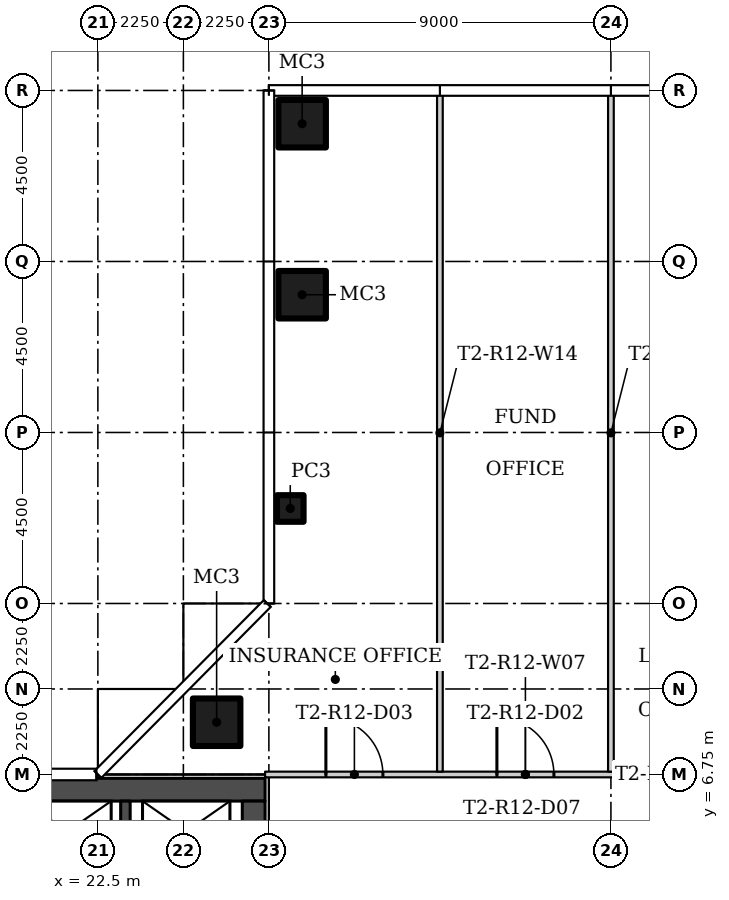
"""IFC4 building model, lengths in metres.
Left out: names, types, materials, properties, quantities, classifications, styles, units other than length and angle.
Written with IfcOpenShell. Run it as: python <this file> out.ifc"""

import sys

from ifc_helpers import new_model, si_unit, direction, frame, frame_2d, origin, origin_2d, place, context, subcontext, project, spatial, rectangle, hollow_rectangle, extrude, element, fill, save


model = new_model("IFC4")
c1 = context("Model", 3, precision=1e-05, world=origin(), true_north=direction((0.0, 1.0)))
c2 = subcontext(c1, "Body", "Model", "MODEL_VIEW")
j1 = project(units=[si_unit("LENGTHUNIT", "METRE"), si_unit("PLANEANGLEUNIT", "RADIAN")], contexts=[c1])
p1 = place(None, origin())
s1 = spatial("IfcSite", under=j1, at=p1, CompositionType="ELEMENT")
p2 = place(p1, origin())
s2 = spatial("IfcBuilding", under=s1, at=p2, CompositionType="ELEMENT")
p3 = place(p2, frame((0.0, 0.0, 113.1)))
s3 = spatial("IfcBuildingStorey", under=s2, at=p3, CompositionType="ELEMENT", Elevation=113.1)
p4 = place(p3, frame((25.625, 8.125, 0.0)))
e1 = element("IfcColumn", 1, at=p4, inside=s3, PredefinedType="COLUMN", context=c2, shape_type="SweptSolid", body=[
    extrude(hollow_rectangle(XDim=1.25, YDim=1.25, WallThickness=0.05, at=origin_2d()), origin(), (0.0, 0.0, 1.0), 3.55),
])
p5 = place(p3, frame((27.562, 13.75, 0.0)))
e2 = element("IfcColumn", 2, at=p5, inside=s3, PredefinedType="COLUMN", context=c2, shape_type="SweptSolid", body=[
    extrude(hollow_rectangle(XDim=0.7, YDim=0.7, WallThickness=0.025, at=origin_2d()), origin(), (0.0, 0.0, 1.0), 3.55),
])
for number, where in (
    (3, (27.875, 19.375, 0.0)),
    (4, (27.875, 23.875, 0.0)),
):
    element("IfcColumn", number, at=place(p3, frame(where)), inside=s3, PredefinedType="COLUMN", context=c2, shape_type="SweptSolid", body=[
        extrude(hollow_rectangle(XDim=1.25, YDim=1.25, WallThickness=0.05, at=origin_2d()), origin(), (0.0, 0.0, 1.0), 3.55),
    ])
p6 = place(p3, frame((26.9, 6.75, 0.0)))
e5 = element("IfcWall", 5, at=p6, inside=s3, PredefinedType="PARTITIONING", context=c2, shape_type="SweptSolid", body=[
    extrude(rectangle(XDim=13.7, YDim=0.15, at=frame_2d((6.85, 0.0))), origin(), (0.0, 0.0, 1.0), 3.55),
])
p7 = place(p6, frame((10.85, 0.0, 0.0)))
e6 = element("IfcOpeningElement", 6, at=p7, cuts=e5, PredefinedType="OPENING", context=c2, shape_type="SweptSolid", body=[
    extrude(rectangle(XDim=1.0, YDim=2.4, at=frame_2d((0.5, 1.2))), frame((0.0, 0.085, 0.0), z_axis=(0.0, -1.0, 0.0), x_axis=(1.0, 0.0, 0.0)), (0.0, 0.0, 1.0), 0.17),
])
p8 = place(p6, frame((6.1, 0.0, 0.0)))
e7 = element("IfcOpeningElement", 7, at=p8, cuts=e5, PredefinedType="OPENING", context=c2, shape_type="SweptSolid", body=[
    extrude(rectangle(XDim=1.5, YDim=2.1, at=frame_2d((0.75, 1.05))), frame((0.0, 0.085, 0.0), z_axis=(0.0, -1.0, 0.0), x_axis=(1.0, 0.0, 0.0)), (0.0, 0.0, 1.0), 0.17),
])
p9 = place(p6, frame((1.6, 0.0, 0.0)))
e8 = element("IfcOpeningElement", 8, at=p9, cuts=e5, PredefinedType="OPENING", context=c2, shape_type="SweptSolid", body=[
    extrude(rectangle(XDim=1.5, YDim=2.1, at=frame_2d((0.75, 1.05))), frame((0.0, 0.085, 0.0), z_axis=(0.0, -1.0, 0.0), x_axis=(1.0, 0.0, 0.0)), (0.0, 0.0, 1.0), 0.17),
])
for number, where, z_axis, x_axis in (
    (9, (36.0, 24.655, 0.0), (0.0, 0.0, 1.0), (0.0, -1.0, 0.0)),
    (10, (31.5, 24.655, 0.0), (0.0, 0.0, 1.0), (0.0, -1.0, 0.0)),
):
    element("IfcWall", number, at=place(p3, frame(where, z_axis=z_axis, x_axis=x_axis)), inside=s3, PredefinedType="PARTITIONING", context=c2, shape_type="SweptSolid", body=[
        extrude(rectangle(XDim=17.83, YDim=0.15, at=frame_2d((8.915, 0.0))), origin(), (0.0, 0.0, 1.0), 3.55),
    ])
p10 = place(p3, frame((13.6, 6.35, 0.0)))
e11 = element("IfcWall", 11, at=p10, inside=s3, PredefinedType="SHEAR", context=c2, shape_type="SweptSolid", body=[
    extrude(rectangle(XDim=13.3, YDim=0.6, at=frame_2d((6.65, 0.0))), origin(), (0.0, 0.0, 1.0), 3.55),
])
p11 = place(p3, frame((26.6, 6.05, 0.0), z_axis=(0.0, 0.0, 1.0), x_axis=(0.0, -1.0, 0.0)))
e12 = element("IfcWall", 12, at=p11, inside=s3, PredefinedType="SHEAR", context=c2, shape_type="SweptSolid", body=[
    extrude(rectangle(XDim=12.1, YDim=0.6, at=frame_2d((6.05, 0.0))), origin(), (0.0, 0.0, 1.0), 3.55),
])
p12 = place(p11, frame((10.1, 0.0, 0.0)))
e13 = element("IfcOpeningElement", 13, at=p12, cuts=e12, PredefinedType="OPENING", context=c2, shape_type="SweptSolid", body=[
    extrude(rectangle(XDim=1.2, YDim=2.1, at=frame_2d((0.6, 1.05))), frame((0.0, 0.31, 0.0), z_axis=(0.0, -1.0, 0.0), x_axis=(1.0, 0.0, 0.0)), (0.0, 0.0, 1.0), 0.62),
])
p13 = place(p11, frame((3.9, 0.0, 0.0)))
e14 = element("IfcOpeningElement", 14, at=p13, cuts=e12, PredefinedType="OPENING", context=c2, shape_type="SweptSolid", body=[
    extrude(rectangle(XDim=1.8, YDim=2.4, at=frame_2d((0.9, 1.2))), frame((0.0, 0.31, 0.0), z_axis=(0.0, -1.0, 0.0), x_axis=(1.0, 0.0, 0.0)), (0.0, 0.0, 1.0), 0.62),
])
p14 = place(p3, frame((23.225, 3.25, 0.0), z_axis=(0.0, 0.0, 1.0), x_axis=(0.0, 1.0, 0.0)))
e15 = element("IfcWall", 15, at=p14, inside=s3, PredefinedType="SHEAR", context=c2, shape_type="SweptSolid", body=[
    extrude(rectangle(XDim=2.8, YDim=0.25, at=frame_2d((1.4, 0.0))), origin(), (0.0, 0.0, 1.0), 3.55),
])
p15 = place(p8, origin())
e16 = element("IfcDoor", 16, at=p15, inside=s3, OperationType="DOUBLE_DOOR_SINGLE_SWING", PredefinedType="DOOR", context=c2, shape_type="SweptSolid", body=[
    extrude(rectangle(XDim=1.5, YDim=2.1, at=frame_2d((0.75, 1.05))), frame((0.0, 0.025, 0.0), z_axis=(0.0, -1.0, 0.0), x_axis=(1.0, 0.0, 0.0)), (0.0, 0.0, 1.0), 0.05),
])
fill(e7, e16)
p16 = place(p9, origin())
e17 = element("IfcDoor", 17, at=p16, inside=s3, OperationType="DOUBLE_DOOR_SINGLE_SWING", PredefinedType="DOOR", context=c2, shape_type="SweptSolid", body=[
    extrude(rectangle(XDim=1.5, YDim=2.1, at=frame_2d((0.75, 1.05))), frame((0.0, 0.025, 0.0), z_axis=(0.0, -1.0, 0.0), x_axis=(1.0, 0.0, 0.0)), (0.0, 0.0, 1.0), 0.05),
])
fill(e8, e17)
save(model, sys.argv[1])
